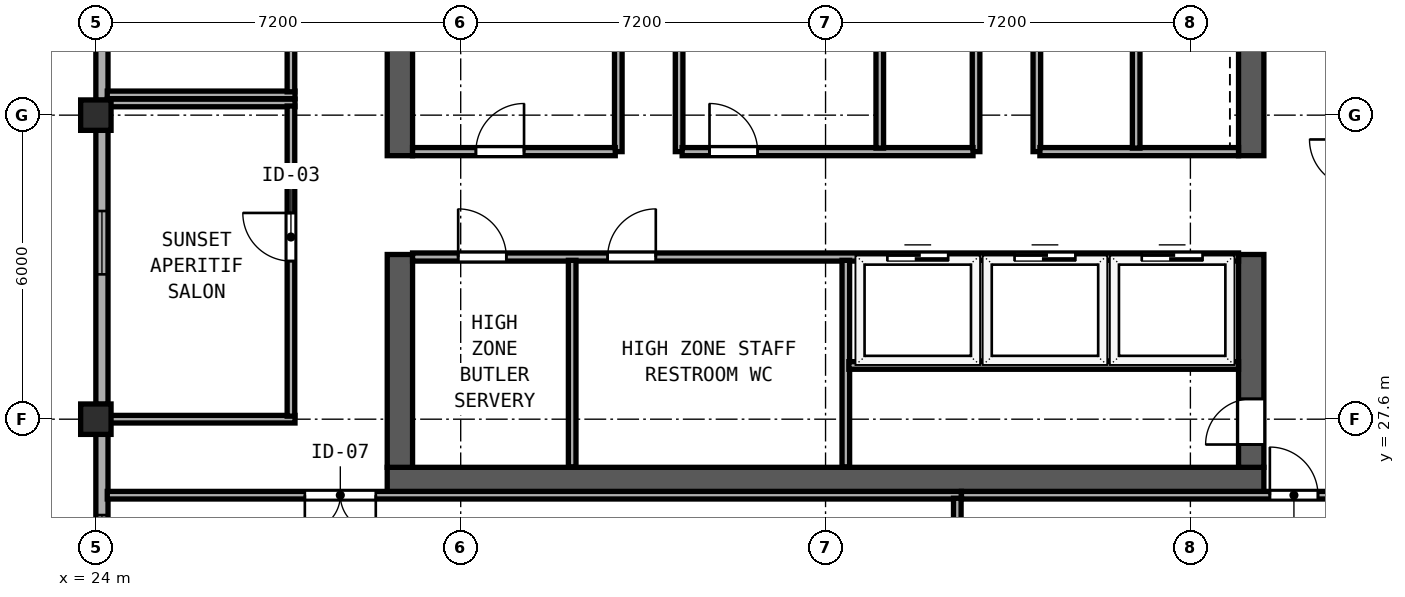
"""IFC4 building model, lengths in metres.
Left out: names, types, materials, properties, quantities, classifications, styles, units other than length and angle.
Written with IfcOpenShell. Run it as: python <this file> out.ifc"""

import sys

from ifc_helpers import new_model, si_unit, direction, frame, frame_2d, origin, origin_2d, place, context, subcontext, project, spatial, rectangle, hollow_rectangle, extrude, element, fill, save


model = new_model("IFC4")
c1 = context("Model", 3, precision=1e-05, world=origin(), true_north=direction((0.0, 1.0)))
c2 = subcontext(c1, "Body", "Model", "MODEL_VIEW")
j1 = project(units=[si_unit("LENGTHUNIT", "METRE"), si_unit("PLANEANGLEUNIT", "RADIAN")], contexts=[c1])
p1 = place(None, origin())
s1 = spatial("IfcSite", under=j1, at=p1, CompositionType="ELEMENT")
p2 = place(p1, origin())
s2 = spatial("IfcBuilding", under=s1, at=p2, CompositionType="ELEMENT")
p3 = place(p2, frame((0.0, 0.0, 313.4)))
s3 = spatial("IfcBuildingStorey", under=s2, at=p3, CompositionType="ELEMENT", Elevation=313.4)
p4 = place(p3, frame((29.75, 26.4, 0.0), z_axis=(0.0, 0.0, 1.0), x_axis=(1.0, 0.0, 0.0)))
e1 = element("IfcWall", 1, at=p4, inside=s3, PredefinedType="SHEAR", context=c2, shape_type="SweptSolid", body=[
    extrude(rectangle(XDim=17.3, YDim=0.5, at=frame_2d((8.65, 0.0))), origin(), (0.0, 0.0, 1.0), 4.56),
])
p5 = place(p3, frame((30.0, 26.65, 0.0), z_axis=(0.0, 0.0, 1.0), x_axis=(0.0, 1.0, 0.0)))
e2 = element("IfcWall", 2, at=p5, inside=s3, PredefinedType="SHEAR", context=c2, shape_type="SweptSolid", body=[
    extrude(rectangle(XDim=4.2, YDim=0.5, at=frame_2d((2.1, 0.0))), origin(), (0.0, 0.0, 1.0), 4.56),
])
p6 = place(p3, frame((30.0, 32.8, 0.0), z_axis=(0.0, 0.0, 1.0), x_axis=(0.0, 1.0, 0.0)))
e3 = element("IfcWall", 3, at=p6, inside=s3, PredefinedType="SHEAR", context=c2, shape_type="SweptSolid", body=[
    extrude(rectangle(XDim=10.15, YDim=0.5, at=frame_2d((5.075, 0.0))), origin(), (0.0, 0.0, 1.0), 4.56),
])
p7 = place(p3, frame((46.8, 26.65, 0.0), z_axis=(0.0, 0.0, 1.0), x_axis=(0.0, 1.0, 0.0)))
e4 = element("IfcWall", 4, at=p7, inside=s3, PredefinedType="SHEAR", context=c2, shape_type="SweptSolid", body=[
    extrude(rectangle(XDim=4.2, YDim=0.5, at=frame_2d((2.1, 0.0))), origin(), (0.0, 0.0, 1.0), 4.56),
])
p8 = place(p7, frame((1.35, 0.0, 0.0), z_axis=(0.0, 0.0, 1.0), x_axis=(-1.0, 0.0, 0.0)))
e5 = element("IfcOpeningElement", 5, at=p8, cuts=e4, PredefinedType="OPENING", context=c2, shape_type="SweptSolid", body=[
    extrude(rectangle(XDim=0.9, YDim=2.1, at=frame_2d((0.45, 1.05))), frame((0.0, 0.26, 0.0), z_axis=(0.0, -1.0, 0.0), x_axis=(1.0, 0.0, 0.0)), (0.0, 0.0, 1.0), 0.52),
])
p9 = place(p3, frame((46.8, 32.8, 0.0), z_axis=(0.0, 0.0, 1.0), x_axis=(0.0, 1.0, 0.0)))
e6 = element("IfcWall", 6, at=p9, inside=s3, PredefinedType="SHEAR", context=c2, shape_type="SweptSolid", body=[
    extrude(rectangle(XDim=10.15, YDim=0.5, at=frame_2d((5.075, 0.0))), origin(), (0.0, 0.0, 1.0), 4.56),
])
for number, where, z_axis, x_axis in (
    (7, (24.0, 33.6, 0.0), (0.0, 0.0, 1.0), (1.0, 0.0, 0.0)),
    (8, (24.0, 27.6, 0.0), (0.0, 0.0, 1.0), (1.0, 0.0, 0.0)),
):
    element("IfcColumn", number, at=place(p3, frame(where, z_axis=z_axis, x_axis=x_axis)), inside=s3, PredefinedType="COLUMN", context=c2, shape_type="SweptSolid", body=[
        extrude(hollow_rectangle(XDim=0.6, YDim=0.6, WallThickness=0.024, at=origin_2d()), origin(), (0.0, 0.0, 1.0), 4.8),
    ])
p10 = place(p3, frame((24.12, 39.308, 0.0), z_axis=(0.0, 0.0, 1.0), x_axis=(0.0, -1.0, 0.0)))
e9 = element("IfcWall", 9, at=p10, inside=s3, PredefinedType="SOLIDWALL", context=c2, shape_type="SweptSolid", body=[
    extrude(rectangle(XDim=5.416, YDim=0.24, at=frame_2d((2.708, 0.0))), origin(), (0.0, 0.0, 1.0), 4.155),
])
p11 = place(p10, frame((1.6, 0.0, 0.85)))
e10 = element("IfcOpeningElement", 10, at=p11, cuts=e9, PredefinedType="OPENING", context=c2, shape_type="SweptSolid", body=[
    extrude(rectangle(XDim=1.25, YDim=1.95, at=frame_2d((0.625, 0.975))), frame((0.0, 0.13, 0.0), z_axis=(0.0, -1.0, 0.0), x_axis=(1.0, 0.0, 0.0)), (0.0, 0.0, 1.0), 0.26),
])
p12 = place(p3, frame((24.12, 33.308, 0.0), z_axis=(0.0, 0.0, 1.0), x_axis=(0.0, -1.0, 0.0)))
e11 = element("IfcWall", 11, at=p12, inside=s3, PredefinedType="SOLIDWALL", context=c2, shape_type="SweptSolid", body=[
    extrude(rectangle(XDim=5.416, YDim=0.24, at=frame_2d((2.708, 0.0))), origin(), (0.0, 0.0, 1.0), 4.155),
])
p13 = place(p12, frame((1.6, 0.0, 0.85)))
e12 = element("IfcOpeningElement", 12, at=p13, cuts=e11, PredefinedType="OPENING", context=c2, shape_type="SweptSolid", body=[
    extrude(rectangle(XDim=1.25, YDim=1.95, at=frame_2d((0.625, 0.975))), frame((0.0, 0.13, 0.0), z_axis=(0.0, -1.0, 0.0), x_axis=(1.0, 0.0, 0.0)), (0.0, 0.0, 1.0), 0.26),
])
p14 = place(p3, frame((24.12, 27.308, 0.0), z_axis=(0.0, 0.0, 1.0), x_axis=(0.0, -1.0, 0.0)))
e13 = element("IfcWall", 13, at=p14, inside=s3, PredefinedType="SOLIDWALL", context=c2, shape_type="SweptSolid", body=[
    extrude(rectangle(XDim=5.416, YDim=0.24, at=frame_2d((2.708, 0.0))), origin(), (0.0, 0.0, 1.0), 4.155),
])
p15 = place(p14, frame((1.6, 0.0, 0.85)))
e14 = element("IfcOpeningElement", 14, at=p15, cuts=e13, PredefinedType="OPENING", context=c2, shape_type="SweptSolid", body=[
    extrude(rectangle(XDim=1.25, YDim=1.95, at=frame_2d((0.625, 0.975))), frame((0.0, 0.13, 0.0), z_axis=(0.0, -1.0, 0.0), x_axis=(1.0, 0.0, 0.0)), (0.0, 0.0, 1.0), 0.26),
])
for number, where, z_axis, x_axis in (
    (15, (34.31, 32.88, 0.0), (0.0, 0.0, 1.0), (0.0, 1.0, 0.0)),
    (16, (35.51, 32.88, 0.0), (0.0, 0.0, 1.0), (0.0, 1.0, 0.0)),
    (17, (41.37, 32.88, 0.0), (0.0, 0.0, 1.0), (0.0, 1.0, 0.0)),
    (18, (42.57, 32.88, 0.0), (0.0, 0.0, 1.0), (0.0, 1.0, 0.0)),
):
    element("IfcWall", number, at=place(p3, frame(where, z_axis=z_axis, x_axis=x_axis)), inside=s3, PredefinedType="SOLIDWALL", context=c2, shape_type="SweptSolid", body=[
        extrude(rectangle(XDim=2.17, YDim=0.15, at=frame_2d((1.085, 0.0))), origin(), (0.0, 0.0, 1.0), 4.56),
    ])
p16 = place(p3, frame((30.25, 32.88, 0.0), z_axis=(0.0, 0.0, 1.0), x_axis=(1.0, 0.0, 0.0)))
e19 = element("IfcWall", 19, at=p16, inside=s3, PredefinedType="SOLIDWALL", context=c2, shape_type="SweptSolid", body=[
    extrude(rectangle(XDim=4.0, YDim=0.16, at=frame_2d((2.0, 0.0))), origin(), (0.0, 0.0, 1.0), 4.56),
])
p17 = place(p16, frame((2.2, 0.0, 0.0), z_axis=(0.0, 0.0, 1.0), x_axis=(-1.0, 0.0, 0.0)))
e20 = element("IfcOpeningElement", 20, at=p17, cuts=e19, PredefinedType="OPENING", context=c2, shape_type="SweptSolid", body=[
    extrude(rectangle(XDim=0.95, YDim=2.12, at=frame_2d((0.475, 1.06))), frame((0.0, 0.09, 0.0), z_axis=(0.0, -1.0, 0.0), x_axis=(1.0, 0.0, 0.0)), (0.0, 0.0, 1.0), 0.18),
])
p18 = place(p3, frame((35.57, 32.88, 0.0), z_axis=(0.0, 0.0, 1.0), x_axis=(1.0, 0.0, 0.0)))
e21 = element("IfcWall", 21, at=p18, inside=s3, PredefinedType="SOLIDWALL", context=c2, shape_type="SweptSolid", body=[
    extrude(rectangle(XDim=5.74, YDim=0.16, at=frame_2d((2.87, 0.0))), origin(), (0.0, 0.0, 1.0), 4.56),
])
p19 = place(p18, frame((1.49, 0.0, 0.0), z_axis=(0.0, 0.0, 1.0), x_axis=(-1.0, 0.0, 0.0)))
e22 = element("IfcOpeningElement", 22, at=p19, cuts=e21, PredefinedType="OPENING", context=c2, shape_type="SweptSolid", body=[
    extrude(rectangle(XDim=0.95, YDim=2.12, at=frame_2d((0.475, 1.06))), frame((0.0, 0.09, 0.0), z_axis=(0.0, -1.0, 0.0), x_axis=(1.0, 0.0, 0.0)), (0.0, 0.0, 1.0), 0.18),
])
p20 = place(p3, frame((42.63, 32.88, 0.0), z_axis=(0.0, 0.0, 1.0), x_axis=(1.0, 0.0, 0.0)))
e23 = element("IfcWall", 23, at=p20, inside=s3, PredefinedType="SOLIDWALL", context=c2, shape_type="SweptSolid", body=[
    extrude(rectangle(XDim=3.92, YDim=0.16, at=frame_2d((1.96, 0.0))), origin(), (0.0, 0.0, 1.0), 4.56),
])
for number, where, z_axis, x_axis in (
    (24, (39.47, 32.95, 0.0), (0.0, 0.0, 1.0), (0.0, 1.0, 0.0)),
    (25, (44.53, 32.95, 0.0), (0.0, 0.0, 1.0), (0.0, 1.0, 0.0)),
):
    element("IfcWall", number, at=place(p3, frame(where, z_axis=z_axis, x_axis=x_axis)), inside=s3, PredefinedType="SOLIDWALL", context=c2, shape_type="SweptSolid", body=[
        extrude(rectangle(XDim=2.05, YDim=0.15, at=frame_2d((1.025, 0.0))), origin(), (0.0, 0.0, 1.0), 4.56),
    ])
p21 = place(p3, frame((30.25, 30.8, 0.0), z_axis=(0.0, 0.0, 1.0), x_axis=(1.0, 0.0, 0.0)))
e26 = element("IfcWall", 26, at=p21, inside=s3, PredefinedType="SOLIDWALL", context=c2, shape_type="SweptSolid", body=[
    extrude(rectangle(XDim=16.3, YDim=0.16, at=frame_2d((8.15, 0.0))), origin(), (0.0, 0.0, 1.0), 4.56),
])
p22 = place(p21, frame((0.9, 0.0, 0.0)))
e27 = element("IfcOpeningElement", 27, at=p22, cuts=e26, PredefinedType="OPENING", context=c2, shape_type="SweptSolid", body=[
    extrude(rectangle(XDim=0.95, YDim=2.12, at=frame_2d((0.475, 1.06))), frame((0.0, 0.09, 0.0), z_axis=(0.0, -1.0, 0.0), x_axis=(1.0, 0.0, 0.0)), (0.0, 0.0, 1.0), 0.18),
])
p23 = place(p21, frame((3.85, 0.0, 0.0)))
e28 = element("IfcOpeningElement", 28, at=p23, cuts=e26, PredefinedType="OPENING", context=c2, shape_type="SweptSolid", body=[
    extrude(rectangle(XDim=0.95, YDim=2.12, at=frame_2d((0.475, 1.06))), frame((0.0, 0.09, 0.0), z_axis=(0.0, -1.0, 0.0), x_axis=(1.0, 0.0, 0.0)), (0.0, 0.0, 1.0), 0.18),
])
p24 = place(p21, frame((9.37, 0.0, 0.0)))
e29 = element("IfcOpeningElement", 29, at=p24, cuts=e26, PredefinedType="OPENING", context=c2, shape_type="SweptSolid", body=[
    extrude(rectangle(XDim=1.2, YDim=2.2, at=frame_2d((0.6, 1.1))), frame((0.0, 0.09, 0.0), z_axis=(0.0, -1.0, 0.0), x_axis=(1.0, 0.0, 0.0)), (0.0, 0.0, 1.0), 0.18),
])
p25 = place(p21, frame((11.88, 0.0, 0.0)))
e30 = element("IfcOpeningElement", 30, at=p25, cuts=e26, PredefinedType="OPENING", context=c2, shape_type="SweptSolid", body=[
    extrude(rectangle(XDim=1.2, YDim=2.2, at=frame_2d((0.6, 1.1))), frame((0.0, 0.09, 0.0), z_axis=(0.0, -1.0, 0.0), x_axis=(1.0, 0.0, 0.0)), (0.0, 0.0, 1.0), 0.18),
])
p26 = place(p21, frame((14.39, 0.0, 0.0)))
e31 = element("IfcOpeningElement", 31, at=p26, cuts=e26, PredefinedType="OPENING", context=c2, shape_type="SweptSolid", body=[
    extrude(rectangle(XDim=1.2, YDim=2.2, at=frame_2d((0.6, 1.1))), frame((0.0, 0.09, 0.0), z_axis=(0.0, -1.0, 0.0), x_axis=(1.0, 0.0, 0.0)), (0.0, 0.0, 1.0), 0.18),
])
p27 = place(p3, frame((38.8, 26.66, 0.0), z_axis=(0.0, 0.0, 1.0), x_axis=(0.0, 1.0, 0.0)))
e32 = element("IfcWall", 32, at=p27, inside=s3, PredefinedType="SOLIDWALL", context=c2, shape_type="SweptSolid", body=[
    extrude(rectangle(XDim=4.075, YDim=0.15, at=frame_2d((2.038, 0.0))), origin(), (0.0, 0.0, 1.0), 4.56),
])
p28 = place(p3, frame((33.4, 26.66, 0.0), z_axis=(0.0, 0.0, 1.0), x_axis=(0.0, 1.0, 0.0)))
e33 = element("IfcWall", 33, at=p28, inside=s3, PredefinedType="PARTITIONING", context=c2, shape_type="SweptSolid", body=[
    extrude(rectangle(XDim=4.075, YDim=0.15, at=frame_2d((2.038, 0.0))), origin(), (0.0, 0.0, 1.0), 4.56),
])
p29 = place(p3, frame((38.86, 28.66, 0.0), z_axis=(0.0, 0.0, 1.0), x_axis=(1.0, 0.0, 0.0)))
e34 = element("IfcWall", 34, at=p29, inside=s3, PredefinedType="PARTITIONING", context=c2, shape_type="SweptSolid", body=[
    extrude(rectangle(XDim=7.69, YDim=0.15, at=frame_2d((3.845, 0.0))), origin(), (0.0, 0.0, 1.0), 4.56),
])
for number, where, z_axis, x_axis in (
    (35, (41.47, 28.75, 0.0), (0.0, 0.0, 1.0), (0.0, 1.0, 0.0)),
    (36, (43.98, 28.75, 0.0), (0.0, 0.0, 1.0), (0.0, 1.0, 0.0)),
):
    element("IfcWall", number, at=place(p3, frame(where, z_axis=z_axis, x_axis=x_axis)), inside=s3, PredefinedType="SOLIDWALL", context=c2, shape_type="SweptSolid", body=[
        extrude(rectangle(XDim=1.985, YDim=0.15, at=frame_2d((0.993, 0.0))), origin(), (0.0, 0.0, 1.0), 4.56),
    ])
p30 = place(p3, frame((24.225, 26.1, 0.0), z_axis=(0.0, 0.0, 1.0), x_axis=(1.0, 0.0, 0.0)))
e37 = element("IfcWall", 37, at=p30, inside=s3, PredefinedType="PARTITIONING", context=c2, shape_type="SweptSolid", body=[
    extrude(rectangle(XDim=16.855, YDim=0.15, at=frame_2d((8.427, 0.0))), origin(), (0.0, 0.0, 1.0), 4.56),
])
p31 = place(p30, frame((5.299, 0.0, 0.0), z_axis=(0.0, 0.0, 1.0), x_axis=(-1.0, 0.0, 0.0)))
e38 = element("IfcOpeningElement", 38, at=p31, cuts=e37, PredefinedType="OPENING", context=c2, shape_type="SweptSolid", body=[
    extrude(rectangle(XDim=1.4, YDim=2.18, at=frame_2d((0.7, 1.09))), frame((0.0, 0.085, 0.0), z_axis=(0.0, -1.0, 0.0), x_axis=(1.0, 0.0, 0.0)), (0.0, 0.0, 1.0), 0.17),
])
p32 = place(p3, frame((41.0, 20.612, 0.0), z_axis=(0.0, 0.0, 1.0), x_axis=(0.0, 1.0, 0.0)))
e39 = element("IfcWall", 39, at=p32, inside=s3, PredefinedType="PARTITIONING", context=c2, shape_type="SweptSolid", body=[
    extrude(rectangle(XDim=5.428, YDim=0.15, at=frame_2d((2.714, 0.0))), origin(), (0.0, 0.0, 1.0), 4.56),
])
p33 = place(p3, frame((41.082, 26.1, 0.0), z_axis=(0.0, 0.0, 1.0), x_axis=(1.0, 0.0, 0.0)))
e40 = element("IfcWall", 40, at=p33, inside=s3, PredefinedType="PARTITIONING", context=c2, shape_type="SweptSolid", body=[
    extrude(rectangle(XDim=11.506, YDim=0.15, at=frame_2d((5.753, 0.0))), origin(), (0.0, 0.0, 1.0), 4.56),
])
p34 = place(p33, frame((7.036, 0.0, 0.0), z_axis=(0.0, 0.0, 1.0), x_axis=(-1.0, 0.0, 0.0)))
e41 = element("IfcOpeningElement", 41, at=p34, cuts=e40, PredefinedType="OPENING", context=c2, shape_type="SweptSolid", body=[
    extrude(rectangle(XDim=0.95, YDim=2.12, at=frame_2d((0.475, 1.06))), frame((0.0, 0.085, 0.0), z_axis=(0.0, -1.0, 0.0), x_axis=(1.0, 0.0, 0.0)), (0.0, 0.0, 1.0), 0.17),
])
p35 = place(p3, frame((24.225, 34.0, 0.0), z_axis=(0.0, 0.0, 1.0), x_axis=(1.0, 0.0, 0.0)))
e42 = element("IfcWall", 42, at=p35, inside=s3, PredefinedType="PARTITIONING", context=c2, shape_type="SweptSolid", body=[
    extrude(rectangle(XDim=3.705, YDim=0.15, at=frame_2d((1.853, 0.0))), origin(), (0.0, 0.0, 1.0), 4.56),
])
p36 = place(p3, frame((27.85, 34.06, 0.0), z_axis=(0.0, 0.0, 1.0), x_axis=(0.0, 1.0, 0.0)))
e43 = element("IfcWall", 43, at=p36, inside=s3, PredefinedType="PARTITIONING", context=c2, shape_type="SweptSolid", body=[
    extrude(rectangle(XDim=13.32, YDim=0.15, at=frame_2d((6.66, 0.0))), origin(), (0.0, 0.0, 1.0), 4.56),
])
p37 = place(p36, frame((5.01, 0.0, 0.0), z_axis=(0.0, 0.0, 1.0), x_axis=(-1.0, 0.0, 0.0)))
e44 = element("IfcOpeningElement", 44, at=p37, cuts=e43, PredefinedType="OPENING", context=c2, shape_type="SweptSolid", body=[
    extrude(rectangle(XDim=0.95, YDim=2.12, at=frame_2d((0.475, 1.06))), frame((0.0, 0.085, 0.0), z_axis=(0.0, -1.0, 0.0), x_axis=(1.0, 0.0, 0.0)), (0.0, 0.0, 1.0), 0.17),
])
p38 = place(p3, frame((24.225, 33.84, 0.0), z_axis=(0.0, 0.0, 1.0), x_axis=(1.0, 0.0, 0.0)))
e45 = element("IfcWall", 45, at=p38, inside=s3, PredefinedType="PARTITIONING", context=c2, shape_type="SweptSolid", body=[
    extrude(rectangle(XDim=3.705, YDim=0.15, at=frame_2d((1.853, 0.0))), origin(), (0.0, 0.0, 1.0), 4.56),
])
p39 = place(p3, frame((24.212, 27.6, 0.0), z_axis=(0.0, 0.0, 1.0), x_axis=(1.0, 0.0, 0.0)))
e46 = element("IfcWall", 46, at=p39, inside=s3, PredefinedType="PARTITIONING", context=c2, shape_type="SweptSolid", body=[
    extrude(rectangle(XDim=3.718, YDim=0.15, at=frame_2d((1.859, 0.0))), origin(), (0.0, 0.0, 1.0), 3.845),
])
p40 = place(p3, frame((27.85, 27.66, 0.0), z_axis=(0.0, 0.0, 1.0), x_axis=(0.0, 1.0, 0.0)))
e47 = element("IfcWall", 47, at=p40, inside=s3, PredefinedType="PARTITIONING", context=c2, shape_type="SweptSolid", body=[
    extrude(rectangle(XDim=6.12, YDim=0.15, at=frame_2d((3.06, 0.0))), origin(), (0.0, 0.0, 1.0), 4.56),
])
p41 = place(p40, frame((4.01, 0.0, 0.0), z_axis=(0.0, 0.0, 1.0), x_axis=(-1.0, 0.0, 0.0)))
e48 = element("IfcOpeningElement", 48, at=p41, cuts=e47, PredefinedType="OPENING", context=c2, shape_type="SweptSolid", body=[
    extrude(rectangle(XDim=0.95, YDim=2.12, at=frame_2d((0.475, 1.06))), frame((0.0, 0.085, 0.0), z_axis=(0.0, -1.0, 0.0), x_axis=(1.0, 0.0, 0.0)), (0.0, 0.0, 1.0), 0.17),
])
p42 = place(p13, origin())
e49 = element("IfcWindow", 49, at=p42, inside=s3, PartitioningType="SINGLE_PANEL", PredefinedType="WINDOW", context=c2, shape_type="SweptSolid", body=[
    extrude(rectangle(XDim=1.25, YDim=1.95, at=frame_2d((0.625, 0.975))), frame((0.0, 0.03, 0.0), z_axis=(0.0, -1.0, 0.0), x_axis=(1.0, 0.0, 0.0)), (0.0, 0.0, 1.0), 0.06),
])
fill(e12, e49)
p43 = place(p15, origin())
e50 = element("IfcWindow", 50, at=p43, inside=s3, PartitioningType="SINGLE_PANEL", PredefinedType="WINDOW", context=c2, shape_type="SweptSolid", body=[
    extrude(rectangle(XDim=1.25, YDim=1.95, at=frame_2d((0.625, 0.975))), frame((0.0, 0.03, 0.0), z_axis=(0.0, -1.0, 0.0), x_axis=(1.0, 0.0, 0.0)), (0.0, 0.0, 1.0), 0.06),
])
fill(e14, e50)
p44 = place(p17, origin())
e51 = element("IfcDoor", 51, at=p44, inside=s3, OperationType="SINGLE_SWING_LEFT", PredefinedType="DOOR", context=c2, shape_type="SweptSolid", body=[
    extrude(rectangle(XDim=0.95, YDim=2.12, at=frame_2d((0.475, 1.06))), frame((0.0, 0.025, 0.0), z_axis=(0.0, -1.0, 0.0), x_axis=(1.0, 0.0, 0.0)), (0.0, 0.0, 1.0), 0.05),
])
fill(e20, e51)
p45 = place(p19, origin())
e52 = element("IfcDoor", 52, at=p45, inside=s3, OperationType="SINGLE_SWING_RIGHT", PredefinedType="DOOR", context=c2, shape_type="SweptSolid", body=[
    extrude(rectangle(XDim=0.95, YDim=2.12, at=frame_2d((0.475, 1.06))), frame((0.0, 0.025, 0.0), z_axis=(0.0, -1.0, 0.0), x_axis=(1.0, 0.0, 0.0)), (0.0, 0.0, 1.0), 0.05),
])
fill(e22, e52)
p46 = place(p22, origin())
e53 = element("IfcDoor", 53, at=p46, inside=s3, OperationType="SINGLE_SWING_LEFT", PredefinedType="DOOR", context=c2, shape_type="SweptSolid", body=[
    extrude(rectangle(XDim=0.95, YDim=2.12, at=frame_2d((0.475, 1.06))), frame((0.0, 0.025, 0.0), z_axis=(0.0, -1.0, 0.0), x_axis=(1.0, 0.0, 0.0)), (0.0, 0.0, 1.0), 0.05),
])
fill(e27, e53)
p47 = place(p23, origin())
e54 = element("IfcDoor", 54, at=p47, inside=s3, OperationType="SINGLE_SWING_RIGHT", PredefinedType="DOOR", context=c2, shape_type="SweptSolid", body=[
    extrude(rectangle(XDim=0.95, YDim=2.12, at=frame_2d((0.475, 1.06))), frame((0.0, 0.025, 0.0), z_axis=(0.0, -1.0, 0.0), x_axis=(1.0, 0.0, 0.0)), (0.0, 0.0, 1.0), 0.05),
])
fill(e28, e54)
p48 = place(p8, origin())
e55 = element("IfcDoor", 55, at=p48, inside=s3, OperationType="SINGLE_SWING_RIGHT", PredefinedType="DOOR", context=c2, shape_type="SweptSolid", body=[
    extrude(rectangle(XDim=0.9, YDim=2.1, at=frame_2d((0.45, 1.05))), frame((0.0, -0.135, 0.0), z_axis=(0.0, -1.0, 0.0), x_axis=(1.0, 0.0, 0.0)), (0.0, 0.0, 1.0), 0.05),
])
fill(e5, e55)
p49 = place(p24, origin())
e56 = element("IfcDoor", 56, at=p49, inside=s3, OperationType="SLIDING_TO_RIGHT", PredefinedType="DOOR", context=c2, shape_type="SweptSolid", body=[
    extrude(rectangle(XDim=1.2, YDim=2.2, at=frame_2d((0.6, 1.1))), frame((0.0, 0.025, 0.0), z_axis=(0.0, -1.0, 0.0), x_axis=(1.0, 0.0, 0.0)), (0.0, 0.0, 1.0), 0.05),
])
fill(e29, e56)
p50 = place(p25, origin())
e57 = element("IfcDoor", 57, at=p50, inside=s3, OperationType="SLIDING_TO_RIGHT", PredefinedType="DOOR", context=c2, shape_type="SweptSolid", body=[
    extrude(rectangle(XDim=1.2, YDim=2.2, at=frame_2d((0.6, 1.1))), frame((0.0, 0.025, 0.0), z_axis=(0.0, -1.0, 0.0), x_axis=(1.0, 0.0, 0.0)), (0.0, 0.0, 1.0), 0.05),
])
fill(e30, e57)
p51 = place(p26, origin())
e58 = element("IfcDoor", 58, at=p51, inside=s3, OperationType="SLIDING_TO_RIGHT", PredefinedType="DOOR", context=c2, shape_type="SweptSolid", body=[
    extrude(rectangle(XDim=1.2, YDim=2.2, at=frame_2d((0.6, 1.1))), frame((0.0, 0.025, 0.0), z_axis=(0.0, -1.0, 0.0), x_axis=(1.0, 0.0, 0.0)), (0.0, 0.0, 1.0), 0.05),
])
fill(e31, e58)
p52 = place(p31, origin())
e59 = element("IfcDoor", 59, at=p52, inside=s3, OperationType="DOUBLE_DOOR_SINGLE_SWING", PredefinedType="DOOR", context=c2, shape_type="SweptSolid", body=[
    extrude(rectangle(XDim=1.4, YDim=2.18, at=frame_2d((0.7, 1.09))), frame((0.0, 0.025, 0.0), z_axis=(0.0, -1.0, 0.0), x_axis=(1.0, 0.0, 0.0)), (0.0, 0.0, 1.0), 0.05),
])
fill(e38, e59)
p53 = place(p34, origin())
e60 = element("IfcDoor", 60, at=p53, inside=s3, OperationType="SINGLE_SWING_RIGHT", PredefinedType="DOOR", context=c2, shape_type="SweptSolid", body=[
    extrude(rectangle(XDim=0.95, YDim=2.12, at=frame_2d((0.475, 1.06))), frame((0.0, 0.025, 0.0), z_axis=(0.0, -1.0, 0.0), x_axis=(1.0, 0.0, 0.0)), (0.0, 0.0, 1.0), 0.05),
])
fill(e41, e60)
p54 = place(p41, origin())
e61 = element("IfcDoor", 61, at=p54, inside=s3, OperationType="SINGLE_SWING_LEFT", PredefinedType="DOOR", context=c2, shape_type="SweptSolid", body=[
    extrude(rectangle(XDim=0.95, YDim=2.12, at=frame_2d((0.475, 1.06))), frame((0.0, 0.025, 0.0), z_axis=(0.0, -1.0, 0.0), x_axis=(1.0, 0.0, 0.0)), (0.0, 0.0, 1.0), 0.05),
])
fill(e48, e61)
save(model, sys.argv[1])
